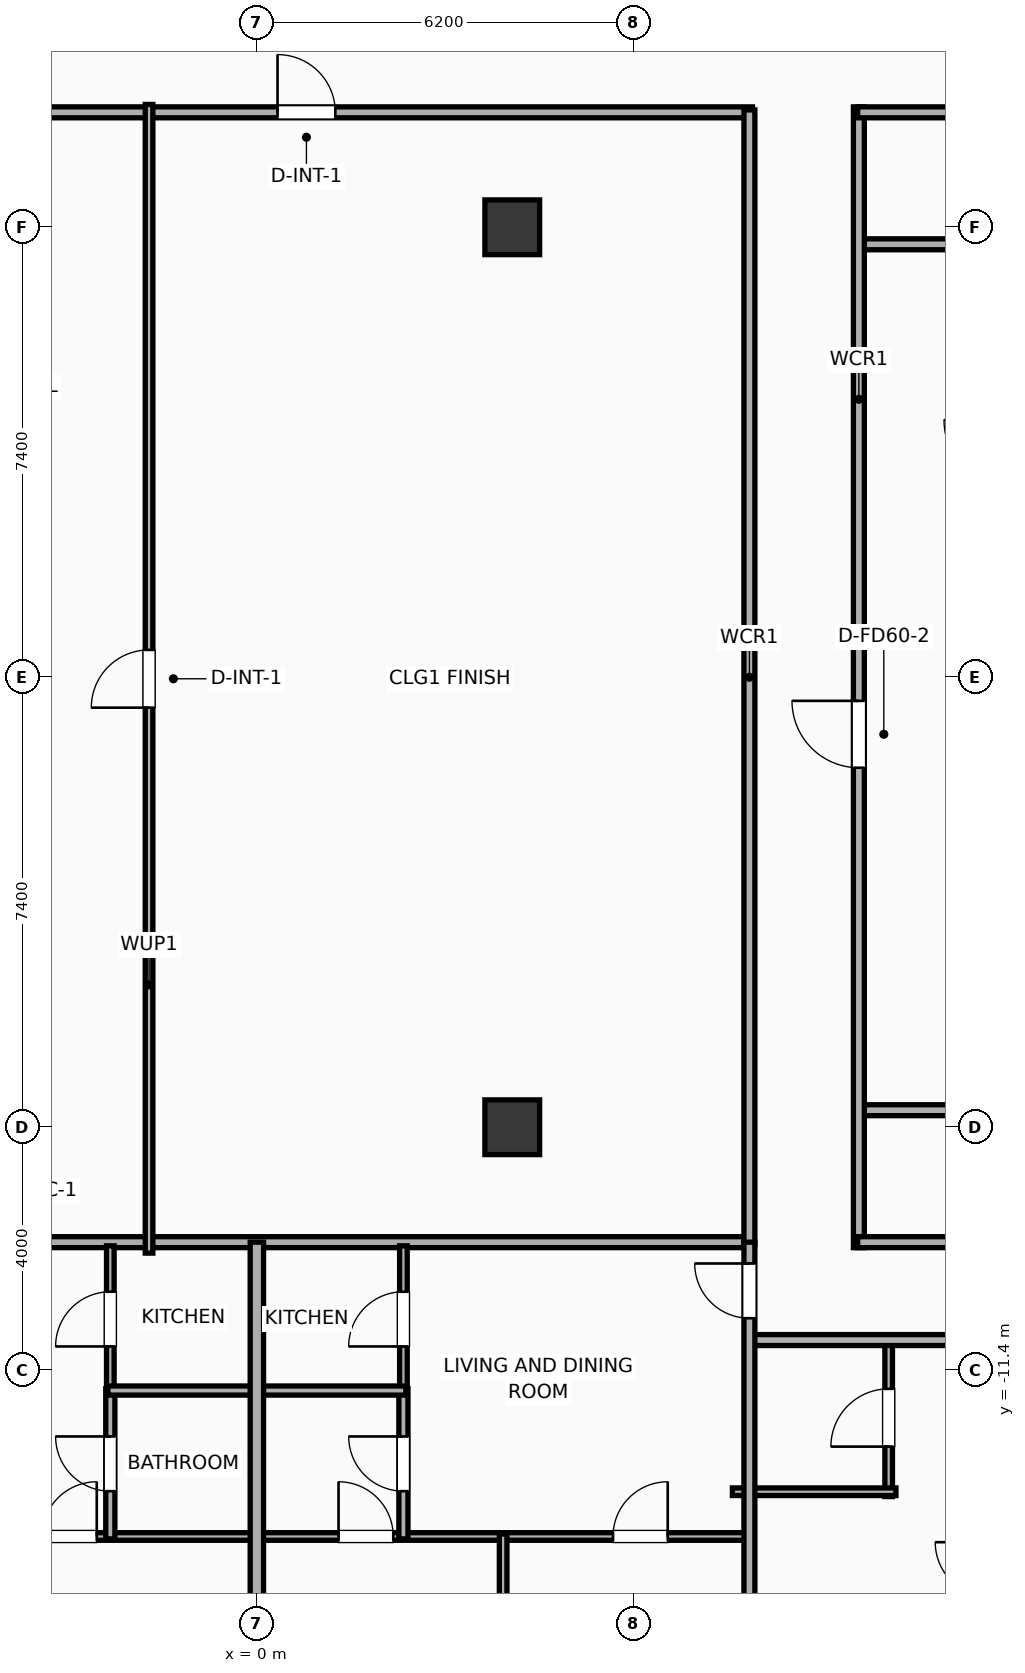
"""IFC4 building model, lengths in metres.
Left out: names, types, materials, properties, quantities, classifications, styles, units other than length and angle.
Written with IfcOpenShell. Run it as: python <this file> out.ifc"""

import sys

from ifc_helpers import new_model, si_unit, direction, frame, frame_2d, origin, origin_2d, place, context, subcontext, project, spatial, rectangle, extrude, element, fill, save


model = new_model("IFC4")
c1 = context("Model", 3, precision=1e-05, world=origin(), true_north=direction((0.0, 1.0)))
c2 = subcontext(c1, "Body", "Model", "MODEL_VIEW")
j1 = project(units=[si_unit("LENGTHUNIT", "METRE"), si_unit("PLANEANGLEUNIT", "RADIAN")], contexts=[c1])
p1 = place(None, origin())
s1 = spatial("IfcSite", under=j1, at=p1, CompositionType="ELEMENT")
p2 = place(p1, origin())
s2 = spatial("IfcBuilding", under=s1, at=p2, CompositionType="ELEMENT")
p3 = place(p2, frame((0.0, 0.0, 243.1)))
s3 = spatial("IfcBuildingStorey", under=s2, at=p3, CompositionType="ELEMENT", Elevation=243.1)
for number, where, z_axis, x_axis in (
    (1, (4.2, -7.4, 0.0), (0.0, 0.0, 1.0), (1.0, 0.0, 0.0)),
    (2, (4.2, 7.4, 0.0), (0.0, 0.0, 1.0), (1.0, 0.0, 0.0)),
):
    element("IfcColumn", number, at=place(p3, frame(where, z_axis=z_axis, x_axis=x_axis)), inside=s3, PredefinedType="COLUMN", context=c2, shape_type="SweptSolid", body=[
        extrude(rectangle(XDim=0.9, YDim=0.9, at=origin_2d()), origin(), (0.0, 0.0, 1.0), 3.9),
    ])
for number, where, z_axis, x_axis in (
    (3, (9.88, 7.12, 0.0), (0.0, 0.0, 1.0), (1.0, 0.0, 0.0)),
    (4, (9.88, -7.12, 0.0), (0.0, 0.0, 1.0), (1.0, 0.0, 0.0)),
):
    element("IfcWall", number, at=place(p3, frame(where, z_axis=z_axis, x_axis=x_axis)), inside=s3, PredefinedType="PARTITIONING", context=c2, shape_type="SweptSolid", body=[
        extrude(rectangle(XDim=2.27, YDim=0.18, at=frame_2d((1.135, 0.0))), origin(), (0.0, 0.0, 1.0), 3.65),
    ])
p4 = place(p3, frame((9.9, -9.38, 0.0), z_axis=(0.0, 0.0, 1.0), x_axis=(0.0, 1.0, 0.0)))
e5 = element("IfcWall", 5, at=p4, inside=s3, PredefinedType="PARTITIONING", context=c2, shape_type="SweptSolid", body=[
    extrude(rectangle(XDim=18.76, YDim=0.18, at=frame_2d((9.38, 0.0))), origin(), (0.0, 0.0, 1.0), 3.65),
])
p5 = place(p4, frame((7.892, 0.0, 0.0)))
e6 = element("IfcOpeningElement", 6, at=p5, cuts=e5, PredefinedType="OPENING", context=c2, shape_type="SweptSolid", body=[
    extrude(rectangle(XDim=1.1, YDim=2.05, at=frame_2d((0.55, 1.025))), frame((0.0, 0.1, 0.0), z_axis=(0.0, -1.0, 0.0), x_axis=(1.0, 0.0, 0.0)), (0.0, 0.0, 1.0), 0.2),
])
p6 = place(p3, frame((9.88, 9.29, 0.0), z_axis=(0.0, 0.0, 1.0), x_axis=(1.0, 0.0, 0.0)))
e7 = element("IfcWall", 7, at=p6, inside=s3, PredefinedType="PARTITIONING", context=c2, shape_type="SweptSolid", body=[
    extrude(rectangle(XDim=20.35, YDim=0.18, at=frame_2d((10.175, 0.0))), origin(), (0.0, 0.0, 1.0), 3.65),
])
p7 = place(p6, frame((15.149, 0.0, 0.0)))
e8 = element("IfcOpeningElement", 8, at=p7, cuts=e7, PredefinedType="OPENING", context=c2, shape_type="SweptSolid", body=[
    extrude(rectangle(XDim=1.15, YDim=2.05, at=frame_2d((0.575, 1.025))), frame((0.0, 0.1, 0.0), z_axis=(0.0, -1.0, 0.0), x_axis=(1.0, 0.0, 0.0)), (0.0, 0.0, 1.0), 0.2),
])
p8 = place(p3, frame((9.88, -9.29, 0.0), z_axis=(0.0, 0.0, 1.0), x_axis=(1.0, 0.0, 0.0)))
e9 = element("IfcWall", 9, at=p8, inside=s3, PredefinedType="PARTITIONING", context=c2, shape_type="SweptSolid", body=[
    extrude(rectangle(XDim=20.35, YDim=0.18, at=frame_2d((10.175, 0.0))), origin(), (0.0, 0.0, 1.0), 3.65),
])
p9 = place(p3, frame((-8.15, 9.29, 0.0), z_axis=(0.0, 0.0, 1.0), x_axis=(1.0, 0.0, 0.0)))
e10 = element("IfcWall", 10, at=p9, inside=s3, PredefinedType="PARTITIONING", context=c2, shape_type="SweptSolid", body=[
    extrude(rectangle(XDim=16.3, YDim=0.18, at=frame_2d((8.15, 0.0))), origin(), (0.0, 0.0, 1.0), 3.65),
])
p10 = place(p9, frame((8.49, 0.0, 0.0)))
e11 = element("IfcOpeningElement", 11, at=p10, cuts=e10, PredefinedType="OPENING", context=c2, shape_type="SweptSolid", body=[
    extrude(rectangle(XDim=0.95, YDim=2.05, at=frame_2d((0.475, 1.025))), frame((0.0, 0.1, 0.0), z_axis=(0.0, -1.0, 0.0), x_axis=(1.0, 0.0, 0.0)), (0.0, 0.0, 1.0), 0.2),
])
p11 = place(p3, frame((-8.15, -9.29, 0.0), z_axis=(0.0, 0.0, 1.0), x_axis=(1.0, 0.0, 0.0)))
e12 = element("IfcWall", 12, at=p11, inside=s3, PredefinedType="PARTITIONING", context=c2, shape_type="SweptSolid", body=[
    extrude(rectangle(XDim=16.3, YDim=0.18, at=frame_2d((8.15, 0.0))), origin(), (0.0, 0.0, 1.0), 3.65),
])
p12 = place(p3, frame((8.1, -9.33, 0.0), z_axis=(0.0, 0.0, 1.0), x_axis=(0.0, 1.0, 0.0)))
e13 = element("IfcWall", 13, at=p12, inside=s3, PredefinedType="PARTITIONING", context=c2, shape_type="SweptSolid", body=[
    extrude(rectangle(XDim=18.66, YDim=0.18, at=frame_2d((9.33, 0.0))), origin(), (0.0, 0.0, 1.0), 3.65),
])
p13 = place(p3, frame((-1.773, -9.47, 0.0), z_axis=(0.0, 0.0, 1.0), x_axis=(0.0, 1.0, 0.0)))
e14 = element("IfcWall", 14, at=p13, inside=s3, PredefinedType="PARTITIONING", context=c2, shape_type="SweptSolid", body=[
    extrude(rectangle(XDim=18.89, YDim=0.125, at=frame_2d((9.445, 0.0))), origin(), (0.0, 0.0, 1.0), 3.65),
])
p14 = place(p13, frame((8.97, 0.0, 0.0)))
e15 = element("IfcOpeningElement", 15, at=p14, cuts=e14, PredefinedType="OPENING", context=c2, shape_type="SweptSolid", body=[
    extrude(rectangle(XDim=0.95, YDim=2.05, at=frame_2d((0.475, 1.025))), frame((0.0, 0.073, 0.0), z_axis=(0.0, -1.0, 0.0), x_axis=(1.0, 0.0, 0.0)), (0.0, 0.0, 1.0), 0.145),
])
p15 = place(p3, frame((10.39, -13.474, 0.0), z_axis=(0.0, 0.0, 1.0), x_axis=(0.0, 1.0, 0.0)))
e16 = element("IfcWall", 16, at=p15, inside=s3, PredefinedType="PARTITIONING", context=c2, shape_type="SweptSolid", body=[
    extrude(rectangle(XDim=2.594, YDim=0.125, at=frame_2d((1.297, 0.0))), origin(), (0.0, 0.0, 1.0), 3.65),
])
p16 = place(p15, frame((0.822, 0.0, 0.0)))
e17 = element("IfcOpeningElement", 17, at=p16, cuts=e16, PredefinedType="OPENING", context=c2, shape_type="SweptSolid", body=[
    extrude(rectangle(XDim=0.95, YDim=2.05, at=frame_2d((0.475, 1.025))), frame((0.0, 0.073, 0.0), z_axis=(0.0, -1.0, 0.0), x_axis=(1.0, 0.0, 0.0)), (0.0, 0.0, 1.0), 0.145),
])
p17 = place(p3, frame((7.82, -13.394, 0.0), z_axis=(0.0, 0.0, 1.0), x_axis=(1.0, 0.0, 0.0)))
e18 = element("IfcWall", 18, at=p17, inside=s3, PredefinedType="PARTITIONING", context=c2, shape_type="SweptSolid", body=[
    extrude(rectangle(XDim=2.69, YDim=0.125, at=frame_2d((1.345, 0.0))), origin(), (0.0, 0.0, 1.0), 3.65),
])
p18 = place(p3, frame((8.08, -10.9, 0.0), z_axis=(0.0, 0.0, 1.0), x_axis=(1.0, 0.0, 0.0)))
e19 = element("IfcWall", 19, at=p18, inside=s3, PredefinedType="PARTITIONING", context=c2, shape_type="SweptSolid", body=[
    extrude(rectangle(XDim=22.15, YDim=0.18, at=frame_2d((11.075, 0.0))), origin(), (0.0, 0.0, 1.0), 3.65),
])
p19 = place(p18, frame((3.283, 0.0, 0.0)))
e20 = element("IfcOpeningElement", 20, at=p19, cuts=e19, PredefinedType="OPENING", context=c2, shape_type="SweptSolid", body=[
    extrude(rectangle(XDim=1.15, YDim=2.05, at=frame_2d((0.575, 1.025))), frame((0.0, 0.1, 0.0), z_axis=(0.0, -1.0, 0.0), x_axis=(1.0, 0.0, 0.0)), (0.0, 0.0, 1.0), 0.2),
])
p20 = place(p18, frame((10.668, 0.0, 0.0)))
e21 = element("IfcOpeningElement", 21, at=p20, cuts=e19, PredefinedType="OPENING", context=c2, shape_type="SweptSolid", body=[
    extrude(rectangle(XDim=1.15, YDim=2.05, at=frame_2d((0.575, 1.025))), frame((0.0, 0.1, 0.0), z_axis=(0.0, -1.0, 0.0), x_axis=(1.0, 0.0, 0.0)), (0.0, 0.0, 1.0), 0.2),
])
p21 = place(p18, frame((18.084, 0.0, 0.0)))
e22 = element("IfcOpeningElement", 22, at=p21, cuts=e19, PredefinedType="OPENING", context=c2, shape_type="SweptSolid", body=[
    extrude(rectangle(XDim=1.15, YDim=2.05, at=frame_2d((0.575, 1.025))), frame((0.0, 0.1, 0.0), z_axis=(0.0, -1.0, 0.0), x_axis=(1.0, 0.0, 0.0)), (0.0, 0.0, 1.0), 0.2),
])
p22 = place(p3, frame((-8.08, -14.13, 0.0), z_axis=(0.0, 0.0, 1.0), x_axis=(1.0, 0.0, 0.0)))
e23 = element("IfcWall", 23, at=p22, inside=s3, PredefinedType="PARTITIONING", context=c2, shape_type="SweptSolid", body=[
    extrude(rectangle(XDim=8.06, YDim=0.125, at=frame_2d((4.03, 0.0))), origin(), (0.0, 0.0, 1.0), 3.65),
])
p23 = place(p22, frame((1.323, 0.0, 0.0)))
e24 = element("IfcOpeningElement", 24, at=p23, cuts=e23, PredefinedType="OPENING", context=c2, shape_type="SweptSolid", body=[
    extrude(rectangle(XDim=0.9, YDim=2.05, at=frame_2d((0.45, 1.025))), frame((0.0, 0.073, 0.0), z_axis=(0.0, -1.0, 0.0), x_axis=(1.0, 0.0, 0.0)), (0.0, 0.0, 1.0), 0.145),
])
p24 = place(p22, frame((4.547, 0.0, 0.0)))
e25 = element("IfcOpeningElement", 25, at=p24, cuts=e23, PredefinedType="OPENING", context=c2, shape_type="SweptSolid", body=[
    extrude(rectangle(XDim=0.9, YDim=2.05, at=frame_2d((0.45, 1.025))), frame((0.0, 0.073, 0.0), z_axis=(0.0, -1.0, 0.0), x_axis=(1.0, 0.0, 0.0)), (0.0, 0.0, 1.0), 0.145),
])
p25 = place(p3, frame((-2.41, -11.76, 0.0), z_axis=(0.0, 0.0, 1.0), x_axis=(0.0, 1.0, 0.0)))
e26 = element("IfcWall", 26, at=p25, inside=s3, PredefinedType="PARTITIONING", context=c2, shape_type="SweptSolid", body=[
    extrude(rectangle(XDim=2.41, YDim=0.125, at=frame_2d((1.205, 0.0))), origin(), (0.0, 0.0, 1.0), 3.65),
])
p26 = place(p25, frame((0.755, 0.0, 0.0)))
e27 = element("IfcOpeningElement", 27, at=p26, cuts=e26, PredefinedType="OPENING", context=c2, shape_type="SweptSolid", body=[
    extrude(rectangle(XDim=0.9, YDim=2.05, at=frame_2d((0.45, 1.025))), frame((0.0, 0.073, 0.0), z_axis=(0.0, -1.0, 0.0), x_axis=(1.0, 0.0, 0.0)), (0.0, 0.0, 1.0), 0.145),
])
p27 = place(p3, frame((-2.41, -14.17, 0.0), z_axis=(0.0, 0.0, 1.0), x_axis=(0.0, 1.0, 0.0)))
e28 = element("IfcWall", 28, at=p27, inside=s3, PredefinedType="PLUMBINGWALL", context=c2, shape_type="SweptSolid", body=[
    extrude(rectangle(XDim=2.47, YDim=0.15, at=frame_2d((1.235, 0.0))), origin(), (0.0, 0.0, 1.0), 3.65),
])
p28 = place(p27, frame((0.785, 0.0, 0.0)))
e29 = element("IfcOpeningElement", 29, at=p28, cuts=e28, PredefinedType="OPENING", context=c2, shape_type="SweptSolid", body=[
    extrude(rectangle(XDim=0.9, YDim=2.05, at=frame_2d((0.45, 1.025))), frame((0.0, 0.085, 0.0), z_axis=(0.0, -1.0, 0.0), x_axis=(1.0, 0.0, 0.0)), (0.0, 0.0, 1.0), 0.17),
])
p29 = place(p3, frame((-2.45, -11.73, 0.0), z_axis=(0.0, 0.0, 1.0), x_axis=(1.0, 0.0, 0.0)))
e30 = element("IfcWall", 30, at=p29, inside=s3, PredefinedType="PLUMBINGWALL", context=c2, shape_type="SweptSolid", body=[
    extrude(rectangle(XDim=2.43, YDim=0.15, at=frame_2d((1.215, 0.0))), origin(), (0.0, 0.0, 1.0), 3.65),
])
p30 = place(p3, frame((0.02, -14.13, 0.0), z_axis=(0.0, 0.0, 1.0), x_axis=(1.0, 0.0, 0.0)))
e31 = element("IfcWall", 31, at=p30, inside=s3, PredefinedType="PARTITIONING", context=c2, shape_type="SweptSolid", body=[
    extrude(rectangle(XDim=8.06, YDim=0.125, at=frame_2d((4.03, 0.0))), origin(), (0.0, 0.0, 1.0), 3.65),
])
p31 = place(p30, frame((1.323, 0.0, 0.0)))
e32 = element("IfcOpeningElement", 32, at=p31, cuts=e31, PredefinedType="OPENING", context=c2, shape_type="SweptSolid", body=[
    extrude(rectangle(XDim=0.9, YDim=2.05, at=frame_2d((0.45, 1.025))), frame((0.0, 0.073, 0.0), z_axis=(0.0, -1.0, 0.0), x_axis=(1.0, 0.0, 0.0)), (0.0, 0.0, 1.0), 0.145),
])
p32 = place(p30, frame((5.837, 0.0, 0.0)))
e33 = element("IfcOpeningElement", 33, at=p32, cuts=e31, PredefinedType="OPENING", context=c2, shape_type="SweptSolid", body=[
    extrude(rectangle(XDim=0.9, YDim=2.05, at=frame_2d((0.45, 1.025))), frame((0.0, 0.073, 0.0), z_axis=(0.0, -1.0, 0.0), x_axis=(1.0, 0.0, 0.0)), (0.0, 0.0, 1.0), 0.145),
])
p33 = place(p3, frame((2.41, -11.76, 0.0), z_axis=(0.0, 0.0, 1.0), x_axis=(0.0, 1.0, 0.0)))
e34 = element("IfcWall", 34, at=p33, inside=s3, PredefinedType="PARTITIONING", context=c2, shape_type="SweptSolid", body=[
    extrude(rectangle(XDim=2.41, YDim=0.125, at=frame_2d((1.205, 0.0))), origin(), (0.0, 0.0, 1.0), 3.65),
])
p34 = place(p33, frame((0.755, 0.0, 0.0)))
e35 = element("IfcOpeningElement", 35, at=p34, cuts=e34, PredefinedType="OPENING", context=c2, shape_type="SweptSolid", body=[
    extrude(rectangle(XDim=0.9, YDim=2.05, at=frame_2d((0.45, 1.025))), frame((0.0, 0.073, 0.0), z_axis=(0.0, -1.0, 0.0), x_axis=(1.0, 0.0, 0.0)), (0.0, 0.0, 1.0), 0.145),
])
p35 = place(p3, frame((2.41, -14.17, 0.0), z_axis=(0.0, 0.0, 1.0), x_axis=(0.0, 1.0, 0.0)))
e36 = element("IfcWall", 36, at=p35, inside=s3, PredefinedType="PLUMBINGWALL", context=c2, shape_type="SweptSolid", body=[
    extrude(rectangle(XDim=2.47, YDim=0.15, at=frame_2d((1.235, 0.0))), origin(), (0.0, 0.0, 1.0), 3.65),
])
p36 = place(p35, frame((0.785, 0.0, 0.0)))
e37 = element("IfcOpeningElement", 37, at=p36, cuts=e36, PredefinedType="OPENING", context=c2, shape_type="SweptSolid", body=[
    extrude(rectangle(XDim=0.9, YDim=2.05, at=frame_2d((0.45, 1.025))), frame((0.0, 0.085, 0.0), z_axis=(0.0, -1.0, 0.0), x_axis=(1.0, 0.0, 0.0)), (0.0, 0.0, 1.0), 0.17),
])
p37 = place(p3, frame((0.02, -11.73, 0.0), z_axis=(0.0, 0.0, 1.0), x_axis=(1.0, 0.0, 0.0)))
e38 = element("IfcWall", 38, at=p37, inside=s3, PredefinedType="PLUMBINGWALL", context=c2, shape_type="SweptSolid", body=[
    extrude(rectangle(XDim=2.43, YDim=0.15, at=frame_2d((1.215, 0.0))), origin(), (0.0, 0.0, 1.0), 3.65),
])
p38 = place(p3, frame((4.05, -18.83, 0.0), z_axis=(0.0, 0.0, 1.0), x_axis=(0.0, 1.0, 0.0)))
e39 = element("IfcWall", 39, at=p38, inside=s3, PredefinedType="PARTITIONING", context=c2, shape_type="SweptSolid", body=[
    extrude(rectangle(XDim=4.74, YDim=0.125, at=frame_2d((2.37, 0.0))), origin(), (0.0, 0.0, 1.0), 3.65),
])
p39 = place(p3, frame((8.1, -18.83, 0.0), z_axis=(0.0, 0.0, 1.0), x_axis=(0.0, 1.0, 0.0)))
e40 = element("IfcWall", 40, at=p39, inside=s3, PredefinedType="PARTITIONING", context=c2, shape_type="SweptSolid", body=[
    extrude(rectangle(XDim=9.54, YDim=0.18, at=frame_2d((4.77, 0.0))), origin(), (0.0, 0.0, 1.0), 3.65),
])
p40 = place(p39, frame((8.29, 0.0, 0.0)))
e41 = element("IfcOpeningElement", 41, at=p40, cuts=e40, PredefinedType="OPENING", context=c2, shape_type="SweptSolid", body=[
    extrude(rectangle(XDim=0.9, YDim=2.05, at=frame_2d((0.45, 1.025))), frame((0.0, 0.1, 0.0), z_axis=(0.0, -1.0, 0.0), x_axis=(1.0, 0.0, 0.0)), (0.0, 0.0, 1.0), 0.2),
])
p41 = place(p3, frame((0.0, -18.83, 0.0), z_axis=(0.0, 0.0, 1.0), x_axis=(0.0, 1.0, 0.0)))
e42 = element("IfcWall", 42, at=p41, inside=s3, PredefinedType="PARTITIONING", context=c2, shape_type="SweptSolid", body=[
    extrude(rectangle(XDim=9.54, YDim=0.22, at=frame_2d((4.77, 0.0))), origin(), (0.0, 0.0, 1.0), 3.65),
])
p42 = place(p5, origin())
e43 = element("IfcDoor", 43, at=p42, inside=s3, OperationType="SINGLE_SWING_RIGHT", PredefinedType="DOOR", context=c2, shape_type="SweptSolid", body=[
    extrude(rectangle(XDim=1.1, YDim=2.05, at=frame_2d((0.55, 1.025))), frame((0.0, 0.025, 0.0), z_axis=(0.0, -1.0, 0.0), x_axis=(1.0, 0.0, 0.0)), (0.0, 0.0, 1.0), 0.05),
])
fill(e6, e43)
p43 = place(p10, origin())
e44 = element("IfcDoor", 44, at=p43, inside=s3, OperationType="SINGLE_SWING_LEFT", PredefinedType="DOOR", context=c2, shape_type="SweptSolid", body=[
    extrude(rectangle(XDim=0.95, YDim=2.05, at=frame_2d((0.475, 1.025))), frame((0.0, 0.025, 0.0), z_axis=(0.0, -1.0, 0.0), x_axis=(1.0, 0.0, 0.0)), (0.0, 0.0, 1.0), 0.05),
])
fill(e11, e44)
p44 = place(p14, origin())
e45 = element("IfcDoor", 45, at=p44, inside=s3, OperationType="SINGLE_SWING_LEFT", PredefinedType="DOOR", context=c2, shape_type="SweptSolid", body=[
    extrude(rectangle(XDim=0.95, YDim=2.05, at=frame_2d((0.475, 1.025))), frame((0.0, 0.025, 0.0), z_axis=(0.0, -1.0, 0.0), x_axis=(1.0, 0.0, 0.0)), (0.0, 0.0, 1.0), 0.05),
])
fill(e15, e45)
p45 = place(p16, origin())
e46 = element("IfcDoor", 46, at=p45, inside=s3, OperationType="SINGLE_SWING_LEFT", PredefinedType="DOOR", context=c2, shape_type="SweptSolid", body=[
    extrude(rectangle(XDim=0.95, YDim=2.05, at=frame_2d((0.475, 1.025))), frame((0.0, 0.025, 0.0), z_axis=(0.0, -1.0, 0.0), x_axis=(1.0, 0.0, 0.0)), (0.0, 0.0, 1.0), 0.05),
])
fill(e17, e46)
p46 = place(p24, origin())
e47 = element("IfcDoor", 47, at=p46, inside=s3, OperationType="SINGLE_SWING_RIGHT", PredefinedType="DOOR", context=c2, shape_type="SweptSolid", body=[
    extrude(rectangle(XDim=0.9, YDim=2.05, at=frame_2d((0.45, 1.025))), frame((0.0, 0.025, 0.0), z_axis=(0.0, -1.0, 0.0), x_axis=(1.0, 0.0, 0.0)), (0.0, 0.0, 1.0), 0.05),
])
fill(e25, e47)
p47 = place(p26, origin())
e48 = element("IfcDoor", 48, at=p47, inside=s3, OperationType="SINGLE_SWING_LEFT", PredefinedType="DOOR", context=c2, shape_type="SweptSolid", body=[
    extrude(rectangle(XDim=0.9, YDim=2.05, at=frame_2d((0.45, 1.025))), frame((0.0, 0.025, 0.0), z_axis=(0.0, -1.0, 0.0), x_axis=(1.0, 0.0, 0.0)), (0.0, 0.0, 1.0), 0.05),
])
fill(e27, e48)
p48 = place(p28, origin())
e49 = element("IfcDoor", 49, at=p48, inside=s3, OperationType="SINGLE_SWING_RIGHT", PredefinedType="DOOR", context=c2, shape_type="SweptSolid", body=[
    extrude(rectangle(XDim=0.9, YDim=2.05, at=frame_2d((0.45, 1.025))), frame((0.0, 0.025, 0.0), z_axis=(0.0, -1.0, 0.0), x_axis=(1.0, 0.0, 0.0)), (0.0, 0.0, 1.0), 0.05),
])
fill(e29, e49)
p49 = place(p31, origin())
e50 = element("IfcDoor", 50, at=p49, inside=s3, OperationType="SINGLE_SWING_LEFT", PredefinedType="DOOR", context=c2, shape_type="SweptSolid", body=[
    extrude(rectangle(XDim=0.9, YDim=2.05, at=frame_2d((0.45, 1.025))), frame((0.0, 0.025, 0.0), z_axis=(0.0, -1.0, 0.0), x_axis=(1.0, 0.0, 0.0)), (0.0, 0.0, 1.0), 0.05),
])
fill(e32, e50)
p50 = place(p32, origin())
e51 = element("IfcDoor", 51, at=p50, inside=s3, OperationType="SINGLE_SWING_RIGHT", PredefinedType="DOOR", context=c2, shape_type="SweptSolid", body=[
    extrude(rectangle(XDim=0.9, YDim=2.05, at=frame_2d((0.45, 1.025))), frame((0.0, 0.025, 0.0), z_axis=(0.0, -1.0, 0.0), x_axis=(1.0, 0.0, 0.0)), (0.0, 0.0, 1.0), 0.05),
])
fill(e33, e51)
p51 = place(p34, origin())
e52 = element("IfcDoor", 52, at=p51, inside=s3, OperationType="SINGLE_SWING_LEFT", PredefinedType="DOOR", context=c2, shape_type="SweptSolid", body=[
    extrude(rectangle(XDim=0.9, YDim=2.05, at=frame_2d((0.45, 1.025))), frame((0.0, 0.025, 0.0), z_axis=(0.0, -1.0, 0.0), x_axis=(1.0, 0.0, 0.0)), (0.0, 0.0, 1.0), 0.05),
])
fill(e35, e52)
p52 = place(p36, origin())
e53 = element("IfcDoor", 53, at=p52, inside=s3, OperationType="SINGLE_SWING_RIGHT", PredefinedType="DOOR", context=c2, shape_type="SweptSolid", body=[
    extrude(rectangle(XDim=0.9, YDim=2.05, at=frame_2d((0.45, 1.025))), frame((0.0, 0.025, 0.0), z_axis=(0.0, -1.0, 0.0), x_axis=(1.0, 0.0, 0.0)), (0.0, 0.0, 1.0), 0.05),
])
fill(e37, e53)
p53 = place(p40, origin())
e54 = element("IfcDoor", 54, at=p53, inside=s3, OperationType="SINGLE_SWING_RIGHT", PredefinedType="DOOR", context=c2, shape_type="SweptSolid", body=[
    extrude(rectangle(XDim=0.9, YDim=2.05, at=frame_2d((0.45, 1.025))), frame((0.0, 0.025, 0.0), z_axis=(0.0, -1.0, 0.0), x_axis=(1.0, 0.0, 0.0)), (0.0, 0.0, 1.0), 0.05),
])
fill(e41, e54)
save(model, sys.argv[1])
